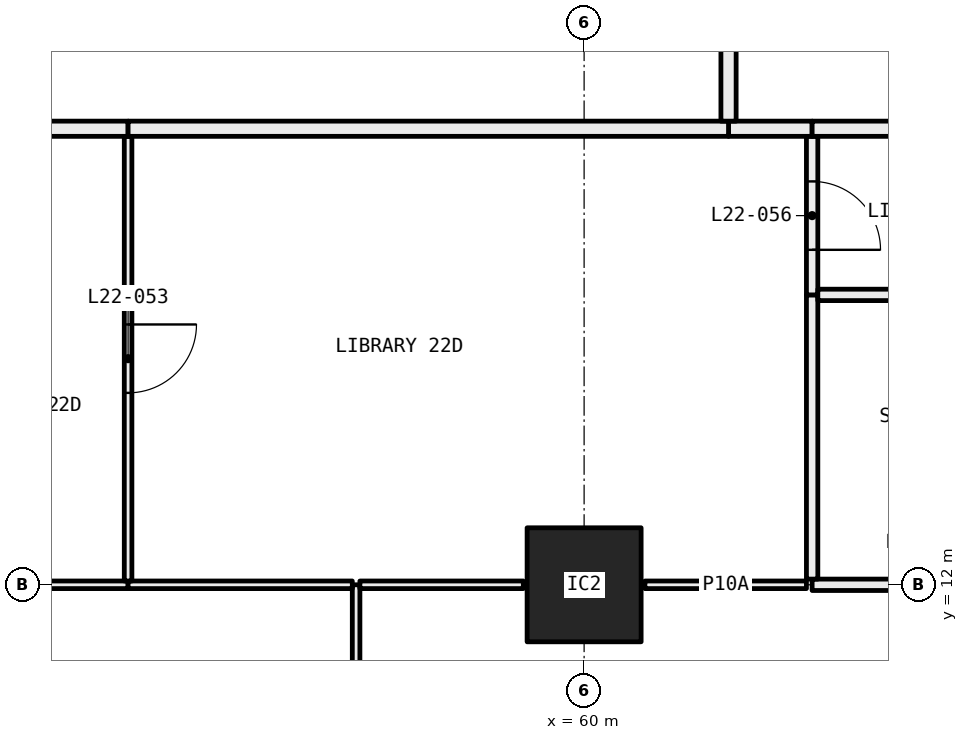
"""IFC4 building model, lengths in metres.
Left out: names, types, materials, properties, quantities, classifications, styles, units other than length and angle.
Written with IfcOpenShell. Run it as: python <this file> out.ifc"""

import sys

from ifc_helpers import new_model, si_unit, direction, frame, frame_2d, origin, origin_2d, place, context, subcontext, project, spatial, rectangle, hollow_rectangle, extrude, element, fill, save


model = new_model("IFC4")
c1 = context("Model", 3, precision=1e-05, world=origin(), true_north=direction((0.0, 1.0)))
c2 = subcontext(c1, "Body", "Model", "MODEL_VIEW")
j1 = project(units=[si_unit("LENGTHUNIT", "METRE"), si_unit("PLANEANGLEUNIT", "RADIAN")], contexts=[c1])
p1 = place(None, origin())
s1 = spatial("IfcSite", under=j1, at=p1, CompositionType="ELEMENT")
p2 = place(p1, origin())
s2 = spatial("IfcBuilding", under=s1, at=p2, CompositionType="ELEMENT")
p3 = place(p2, frame((0.0, 0.0, 88.65)))
s3 = spatial("IfcBuildingStorey", under=s2, at=p3, CompositionType="ELEMENT", Elevation=88.65)
p4 = place(p3, frame((60.0, 12.0, 0.0), z_axis=(0.0, 0.0, 1.0), x_axis=(1.0, 0.0, 0.0)))
e1 = element("IfcColumn", 1, at=p4, inside=s3, PredefinedType="COLUMN", context=c2, shape_type="SweptSolid", body=[
    extrude(hollow_rectangle(XDim=1.5, YDim=1.5, WallThickness=0.065, at=origin_2d()), origin(), (0.0, 0.0, 1.0), 3.05),
])
p5 = place(p3, frame((57.0, 6.05, 0.0), z_axis=(0.0, 0.0, 1.0), x_axis=(0.0, 1.0, 0.0)))
e2 = element("IfcWall", 2, at=p5, inside=s3, PredefinedType="PARTITIONING", context=c2, shape_type="SweptSolid", body=[
    extrude(rectangle(XDim=5.95, YDim=0.1, at=frame_2d((2.975, 0.0))), origin(), (0.0, 0.0, 1.0), 2.45),
])
p6 = place(p5, frame((2.525, 0.0, 0.0)))
e3 = element("IfcOpeningElement", 3, at=p6, cuts=e2, PredefinedType="OPENING", context=c2, shape_type="SweptSolid", body=[
    extrude(rectangle(XDim=0.9, YDim=2.1, at=frame_2d((0.45, 1.05))), frame((0.0, 0.06, 0.0), z_axis=(0.0, -1.0, 0.0), x_axis=(1.0, 0.0, 0.0)), (0.0, 0.0, 1.0), 0.12),
])
p7 = place(p3, frame((54.0, 12.0, 0.0), z_axis=(0.0, 0.0, 1.0), x_axis=(-1.0, 0.0, 0.0)))
e4 = element("IfcWall", 4, at=p7, inside=s3, PredefinedType="PARTITIONING", context=c2, shape_type="SweptSolid", body=[
    extrude(rectangle(XDim=4.5, YDim=0.1, at=frame_2d((2.25, 0.0))), origin(), (0.0, 0.0, 1.0), 2.45),
])
p8 = place(p7, frame((1.8, 0.0, 0.0)))
e5 = element("IfcOpeningElement", 5, at=p8, cuts=e4, PredefinedType="OPENING", context=c2, shape_type="SweptSolid", body=[
    extrude(rectangle(XDim=0.9, YDim=2.1, at=frame_2d((0.45, 1.05))), frame((0.0, 0.06, 0.0), z_axis=(0.0, -1.0, 0.0), x_axis=(1.0, 0.0, 0.0)), (0.0, 0.0, 1.0), 0.12),
])
p9 = place(p3, frame((56.95, 12.0, 0.0), z_axis=(0.0, 0.0, 1.0), x_axis=(-1.0, 0.0, 0.0)))
e6 = element("IfcWall", 6, at=p9, inside=s3, PredefinedType="PARTITIONING", context=c2, shape_type="SweptSolid", body=[
    extrude(rectangle(XDim=2.95, YDim=0.1, at=frame_2d((1.475, 0.0))), origin(), (0.0, 0.0, 1.0), 2.45),
])
p10 = place(p3, frame((59.2, 12.0, 0.0), z_axis=(0.0, 0.0, 1.0), x_axis=(-1.0, 0.0, 0.0)))
e7 = element("IfcWall", 7, at=p10, inside=s3, PredefinedType="PARTITIONING", context=c2, shape_type="SweptSolid", body=[
    extrude(rectangle(XDim=2.15, YDim=0.1, at=frame_2d((1.075, 0.0))), origin(), (0.0, 0.0, 1.0), 2.45),
])
p11 = place(p3, frame((62.925, 12.0, 0.0), z_axis=(0.0, 0.0, 1.0), x_axis=(-1.0, 0.0, 0.0)))
e8 = element("IfcWall", 8, at=p11, inside=s3, PredefinedType="PARTITIONING", context=c2, shape_type="SweptSolid", body=[
    extrude(rectangle(XDim=2.125, YDim=0.1, at=frame_2d((1.062, 0.0))), origin(), (0.0, 0.0, 1.0), 2.45),
])
p12 = place(p3, frame((66.0, 12.0, 0.0), z_axis=(0.0, 0.0, 1.0), x_axis=(-1.0, 0.0, 0.0)))
e9 = element("IfcWall", 9, at=p12, inside=s3, PredefinedType="PARTITIONING", context=c2, shape_type="SweptSolid", body=[
    extrude(rectangle(XDim=3.0, YDim=0.15, at=frame_2d((1.5, 0.0))), origin(), (0.0, 0.0, 1.0), 2.45),
])
p13 = place(p12, frame((1.05, 0.0, 0.0)))
e10 = element("IfcOpeningElement", 10, at=p13, cuts=e9, PredefinedType="OPENING", context=c2, shape_type="SweptSolid", body=[
    extrude(rectangle(XDim=0.9, YDim=2.1, at=frame_2d((0.45, 1.05))), frame((0.0, 0.085, 0.0), z_axis=(0.0, -1.0, 0.0), x_axis=(1.0, 0.0, 0.0)), (0.0, 0.0, 1.0), 0.17),
])
p14 = place(p3, frame((54.0, 12.05, 0.0), z_axis=(0.0, 0.0, 1.0), x_axis=(0.0, 1.0, 0.0)))
e11 = element("IfcWall", 11, at=p14, inside=s3, PredefinedType="PARTITIONING", context=c2, shape_type="SweptSolid", body=[
    extrude(rectangle(XDim=5.85, YDim=0.1, at=frame_2d((2.925, 0.0))), origin(), (0.0, 0.0, 1.0), 2.45),
])
p15 = place(p14, frame((2.475, 0.0, 0.0)))
e12 = element("IfcOpeningElement", 12, at=p15, cuts=e11, PredefinedType="OPENING", context=c2, shape_type="SweptSolid", body=[
    extrude(rectangle(XDim=0.9, YDim=2.1, at=frame_2d((0.45, 1.05))), frame((0.0, 0.06, 0.0), z_axis=(0.0, -1.0, 0.0), x_axis=(1.0, 0.0, 0.0)), (0.0, 0.0, 1.0), 0.12),
])
p16 = place(p3, frame((54.0, 18.0, 0.0), z_axis=(0.0, 0.0, 1.0), x_axis=(-1.0, 0.0, 0.0)))
e13 = element("IfcWall", 13, at=p16, inside=s3, PredefinedType="PARTITIONING", context=c2, shape_type="SweptSolid", body=[
    extrude(rectangle(XDim=4.5, YDim=0.2, at=frame_2d((2.25, 0.0))), origin(), (0.0, 0.0, 1.0), 3.05),
])
p17 = place(p16, frame((1.75, 0.0, 0.0)))
e14 = element("IfcOpeningElement", 14, at=p17, cuts=e13, PredefinedType="OPENING", context=c2, shape_type="SweptSolid", body=[
    extrude(rectangle(XDim=1.0, YDim=2.1, at=frame_2d((0.5, 1.05))), frame((0.0, 0.11, 0.0), z_axis=(0.0, -1.0, 0.0), x_axis=(1.0, 0.0, 0.0)), (0.0, 0.0, 1.0), 0.22),
])
p18 = place(p3, frame((63.0, 12.075, 0.0), z_axis=(0.0, 0.0, 1.0), x_axis=(0.0, 1.0, 0.0)))
e15 = element("IfcWall", 15, at=p18, inside=s3, PredefinedType="PARTITIONING", context=c2, shape_type="SweptSolid", body=[
    extrude(rectangle(XDim=3.739, YDim=0.15, at=frame_2d((1.87, 0.0))), origin(), (0.0, 0.0, 1.0), 2.45),
])
p19 = place(p3, frame((63.0, 15.814, 0.0), z_axis=(0.0, 0.0, 1.0), x_axis=(0.0, 1.0, 0.0)))
e16 = element("IfcWall", 16, at=p19, inside=s3, PredefinedType="PARTITIONING", context=c2, shape_type="SweptSolid", body=[
    extrude(rectangle(XDim=2.086, YDim=0.15, at=frame_2d((1.043, 0.0))), origin(), (0.0, 0.0, 1.0), 3.05),
])
p20 = place(p19, frame((0.593, 0.0, 0.0)))
e17 = element("IfcOpeningElement", 17, at=p20, cuts=e16, PredefinedType="OPENING", context=c2, shape_type="SweptSolid", body=[
    extrude(rectangle(XDim=0.9, YDim=2.1, at=frame_2d((0.45, 1.05))), frame((0.0, 0.085, 0.0), z_axis=(0.0, -1.0, 0.0), x_axis=(1.0, 0.0, 0.0)), (0.0, 0.0, 1.0), 0.17),
])
p21 = place(p3, frame((63.0, 18.0, 0.0), z_axis=(0.0, 0.0, 1.0), x_axis=(-1.0, 0.0, 0.0)))
e18 = element("IfcWall", 18, at=p21, inside=s3, PredefinedType="PARTITIONING", context=c2, shape_type="SweptSolid", body=[
    extrude(rectangle(XDim=1.1, YDim=0.2, at=frame_2d((0.55, 0.0))), origin(), (0.0, 0.0, 1.0), 3.05),
])
p22 = place(p3, frame((61.9, 18.0, 0.0), z_axis=(0.0, 0.0, 1.0), x_axis=(-1.0, 0.0, 0.0)))
e19 = element("IfcWall", 19, at=p22, inside=s3, PredefinedType="PARTITIONING", context=c2, shape_type="SweptSolid", body=[
    extrude(rectangle(XDim=7.9, YDim=0.2, at=frame_2d((3.95, 0.0))), origin(), (0.0, 0.0, 1.0), 3.05),
])
p23 = place(p3, frame((66.071, 15.814, 0.0), z_axis=(0.0, 0.0, 1.0), x_axis=(-1.0, 0.0, 0.0)))
e20 = element("IfcWall", 20, at=p23, inside=s3, PredefinedType="PARTITIONING", context=c2, shape_type="SweptSolid", body=[
    extrude(rectangle(XDim=2.996, YDim=0.15, at=frame_2d((1.498, 0.0))), origin(), (0.0, 0.0, 1.0), 3.05),
])
p24 = place(p3, frame((66.0, 18.0, 0.0), z_axis=(0.0, 0.0, 1.0), x_axis=(-1.0, 0.0, 0.0)))
e21 = element("IfcWall", 21, at=p24, inside=s3, PredefinedType="PARTITIONING", context=c2, shape_type="SweptSolid", body=[
    extrude(rectangle(XDim=3.0, YDim=0.2, at=frame_2d((1.5, 0.0))), origin(), (0.0, 0.0, 1.0), 3.05),
])
p25 = place(p3, frame((61.9, 22.5, 0.0), z_axis=(0.0, 0.0, 1.0), x_axis=(0.0, -1.0, 0.0)))
e22 = element("IfcWall", 22, at=p25, inside=s3, PredefinedType="PARTITIONING", context=c2, shape_type="SweptSolid", body=[
    extrude(rectangle(XDim=4.4, YDim=0.2, at=frame_2d((2.2, 0.0))), origin(), (0.0, 0.0, 1.0), 3.05),
])
p26 = place(p15, frame((0.9, 0.0, 0.0), x_axis=(-1.0, 0.0, 0.0)))
e23 = element("IfcDoor", 23, at=p26, inside=s3, OperationType="SINGLE_SWING_RIGHT", PredefinedType="DOOR", context=c2, shape_type="SweptSolid", body=[
    extrude(rectangle(XDim=0.9, YDim=2.1, at=frame_2d((0.45, 1.05))), frame((0.0, 0.025, 0.0), z_axis=(0.0, -1.0, 0.0), x_axis=(1.0, 0.0, 0.0)), (0.0, 0.0, 1.0), 0.05),
])
fill(e12, e23)
p27 = place(p20, frame((0.9, 0.0, 0.0), x_axis=(-1.0, 0.0, 0.0)))
e24 = element("IfcDoor", 24, at=p27, inside=s3, OperationType="SINGLE_SWING_LEFT", PredefinedType="DOOR", context=c2, shape_type="SweptSolid", body=[
    extrude(rectangle(XDim=0.9, YDim=2.1, at=frame_2d((0.45, 1.05))), frame((0.0, 0.025, 0.0), z_axis=(0.0, -1.0, 0.0), x_axis=(1.0, 0.0, 0.0)), (0.0, 0.0, 1.0), 0.05),
])
fill(e17, e24)
save(model, sys.argv[1])
